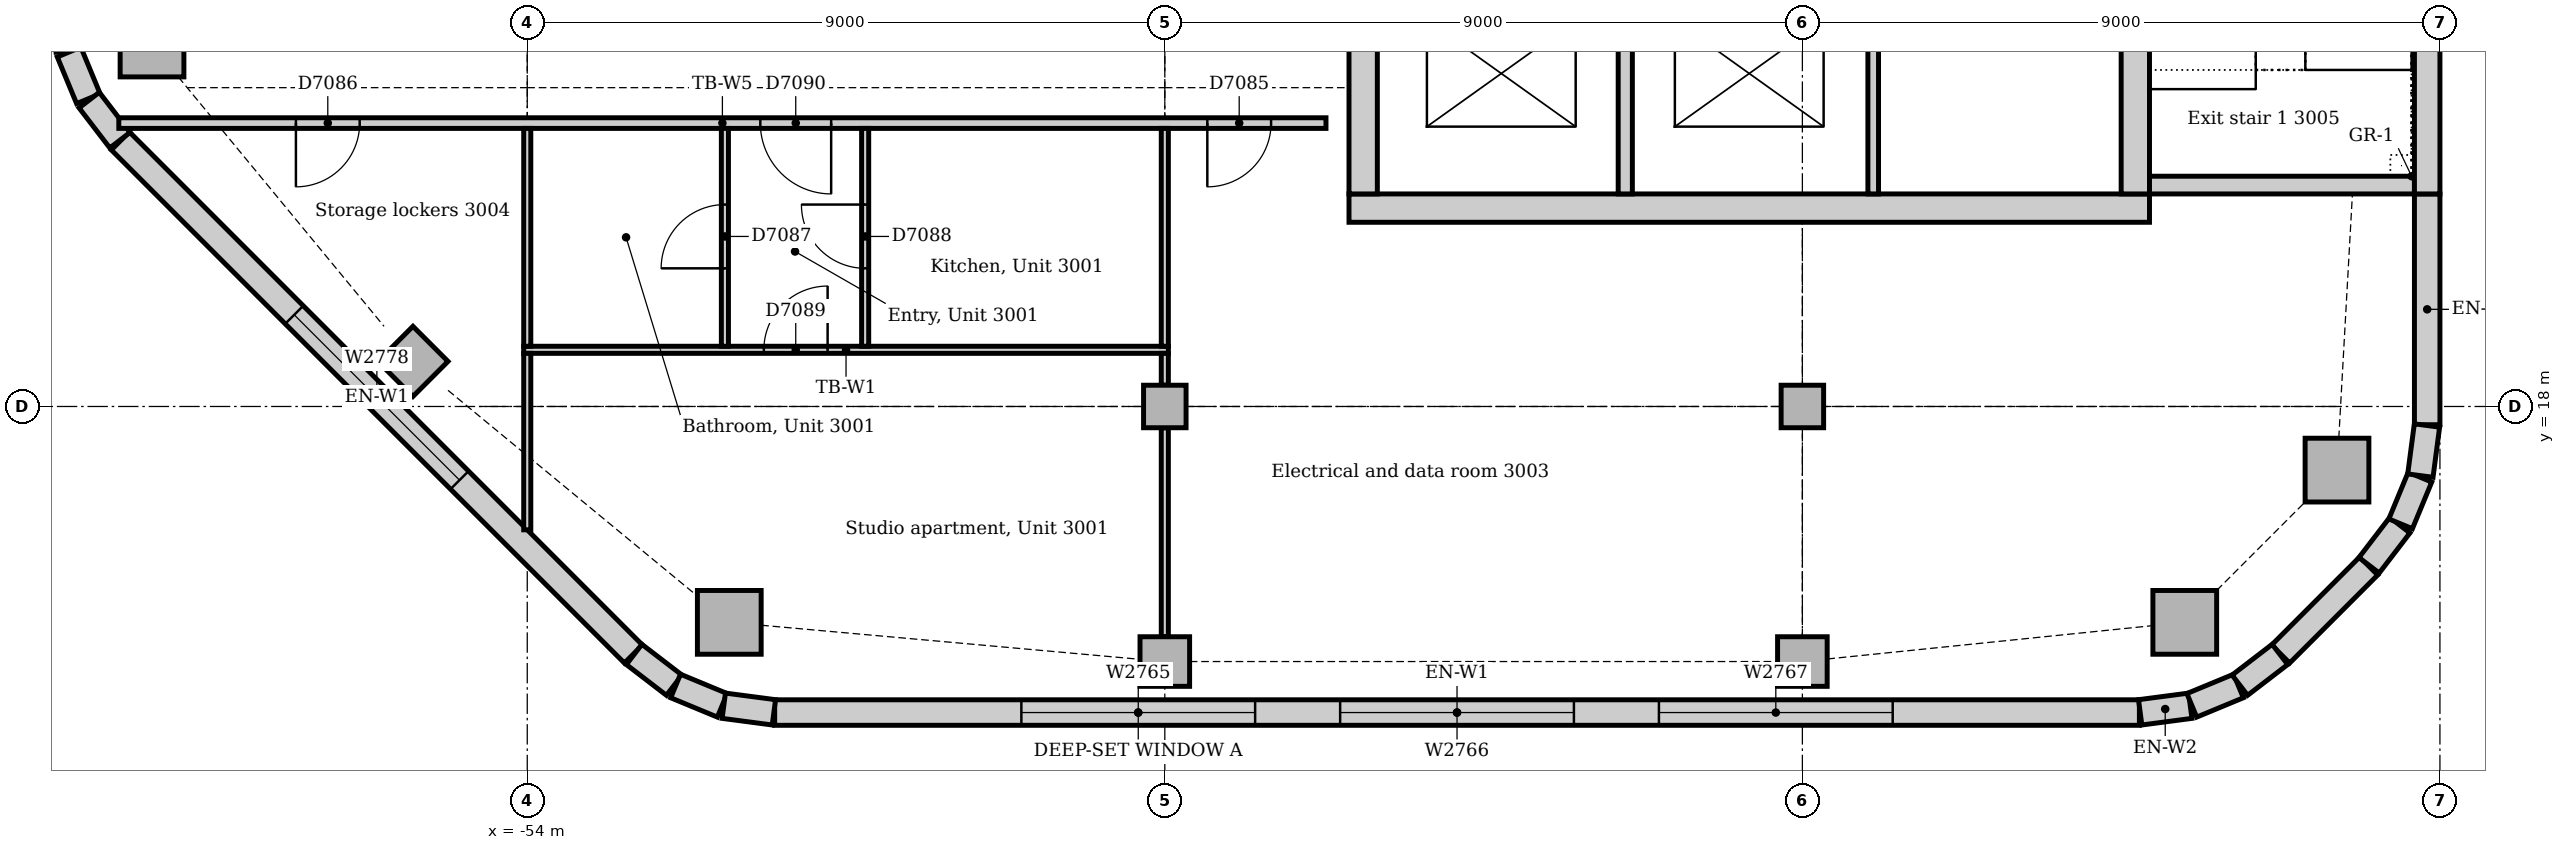
"""IFC4 building model, lengths in metres.
Left out: names, types, materials, properties, quantities, classifications, styles, units other than length and angle.
Written with IfcOpenShell. Run it as: python <this file> out.ifc"""

import sys

from ifc_helpers import new_model, si_unit, direction, frame, frame_2d, origin, origin_2d, place, context, subcontext, project, spatial, rectangle, extrude, element, fill, save


model = new_model("IFC4")
c1 = context("Model", 3, precision=1e-05, world=origin(), true_north=direction((0.0, 1.0)))
c2 = subcontext(c1, "Body", "Model", "MODEL_VIEW")
j1 = project(units=[si_unit("LENGTHUNIT", "METRE"), si_unit("PLANEANGLEUNIT", "RADIAN")], contexts=[c1])
p1 = place(None, origin())
s1 = spatial("IfcSite", under=j1, at=p1, CompositionType="ELEMENT")
p2 = place(p1, origin())
s2 = spatial("IfcBuilding", under=s1, at=p2, CompositionType="ELEMENT")
p3 = place(p2, frame((0.0, 0.0, 128.0)))
s3 = spatial("IfcBuildingStorey", under=s2, at=p3, CompositionType="ELEMENT", Elevation=128.0)
p4 = place(p3, frame((-42.4, 20.8, 0.0), z_axis=(0.0, 0.0, 1.0), x_axis=(1.0, 0.0, 0.0)))
e1 = element("IfcWall", 1, at=p4, inside=s3, PredefinedType="SOLIDWALL", context=c2, shape_type="SweptSolid", body=[
    extrude(rectangle(XDim=11.3, YDim=0.4, at=frame_2d((5.65, 0.0))), origin(), (0.0, 0.0, 1.0), 4.0),
])
p5 = place(p3, frame((-31.3, 21.0, 0.0), z_axis=(0.0, 0.0, 1.0), x_axis=(0.0, 1.0, 0.0)))
e2 = element("IfcWall", 2, at=p5, inside=s3, PredefinedType="SOLIDWALL", context=c2, shape_type="SweptSolid", body=[
    extrude(rectangle(XDim=9.5, YDim=0.4, at=frame_2d((4.75, 0.0))), origin(), (0.0, 0.0, 1.0), 4.0),
])
p6 = place(p5, frame((5.25, 0.0, 0.0)))
e3 = element("IfcOpeningElement", 3, at=p6, cuts=e2, PredefinedType="OPENING", context=c2, shape_type="SweptSolid", body=[
    extrude(rectangle(XDim=1.0, YDim=2.1, at=frame_2d((0.5, 1.05))), frame((0.0, 0.21, 0.0), z_axis=(0.0, -1.0, 0.0), x_axis=(1.0, 0.0, 0.0)), (0.0, 0.0, 1.0), 0.42),
])
p7 = place(p3, frame((-42.2, 30.5, 0.0), z_axis=(0.0, 0.0, 1.0), x_axis=(0.0, -1.0, 0.0)))
e4 = element("IfcWall", 4, at=p7, inside=s3, PredefinedType="SOLIDWALL", context=c2, shape_type="SweptSolid", body=[
    extrude(rectangle(XDim=9.5, YDim=0.4, at=frame_2d((4.75, 0.0))), origin(), (0.0, 0.0, 1.0), 4.0),
])
p8 = place(p7, frame((3.85, 0.0, 0.0)))
e5 = element("IfcOpeningElement", 5, at=p8, cuts=e4, PredefinedType="OPENING", context=c2, shape_type="SweptSolid", body=[
    extrude(rectangle(XDim=1.8, YDim=2.1, at=frame_2d((0.9, 1.05))), frame((0.0, 0.21, 0.0), z_axis=(0.0, -1.0, 0.0), x_axis=(1.0, 0.0, 0.0)), (0.0, 0.0, 1.0), 0.42),
])
p9 = place(p3, frame((-31.1, 21.125, 0.0), z_axis=(0.0, 0.0, 1.0), x_axis=(1.0, 0.0, 0.0)))
e6 = element("IfcWall", 6, at=p9, inside=s3, PredefinedType="SOLIDWALL", context=c2, shape_type="SweptSolid", body=[
    extrude(rectangle(XDim=3.74, YDim=0.25, at=frame_2d((1.87, 0.0))), origin(), (0.0, 0.0, 1.0), 4.0),
])
for number, where, z_axis, x_axis in (
    (7, (-51.148, 14.953, 0.0), (0.0, 0.0, 1.0), (1.0, 0.0, 0.0)),
    (8, (-30.602, 14.953, 0.0), (0.0, 0.0, 1.0), (1.0, 0.0, 0.0)),
    (9, (-28.453, 17.102, 0.0), (0.0, 0.0, 1.0), (1.0, 0.0, 0.0)),
    (10, (-59.297, 23.102, 0.0), (0.0, 0.0, 1.0), (1.0, 0.0, 0.0)),
):
    element("IfcColumn", number, at=place(p3, frame(where, z_axis=z_axis, x_axis=x_axis)), inside=s3, PredefinedType="COLUMN", context=c2, shape_type="SweptSolid", body=[
        extrude(rectangle(XDim=0.9, YDim=0.9, at=origin_2d()), origin(), (0.0, 0.0, 1.0), 3.85),
    ])
for number, where, z_axis, x_axis in (
    (11, (-45.0, 14.4, 0.0), (0.0, 0.0, 1.0), (1.0, 0.0, 0.0)),
    (12, (-36.0, 14.4, 0.0), (0.0, 0.0, 1.0), (1.0, 0.0, 0.0)),
    (13, (-55.614, 18.636, 0.0), (0.0, 0.0, 1.0), (0.707, 0.707, 0.0)),
):
    element("IfcColumn", number, at=place(p3, frame(where, z_axis=z_axis, x_axis=x_axis)), inside=s3, PredefinedType="COLUMN", context=c2, shape_type="SweptSolid", body=[
        extrude(rectangle(XDim=0.7, YDim=0.7, at=origin_2d()), origin(), (0.0, 0.0, 1.0), 3.85),
    ])
for number, where, z_axis, x_axis in (
    (14, (-45.0, 18.0, 0.0), (0.0, 0.0, 1.0), (1.0, 0.0, 0.0)),
    (15, (-36.0, 18.0, 0.0), (0.0, 0.0, 1.0), (1.0, 0.0, 0.0)),
):
    element("IfcColumn", number, at=place(p3, frame(where, z_axis=z_axis, x_axis=x_axis)), inside=s3, PredefinedType="COLUMN", context=c2, shape_type="SweptSolid", body=[
        extrude(rectangle(XDim=0.6, YDim=0.6, at=origin_2d()), origin(), (0.0, 0.0, 1.0), 3.85),
    ])
p10 = place(p3, frame((-50.507, 13.68, 0.0), z_axis=(0.0, 0.0, 1.0), x_axis=(1.0, 0.0, 0.0)))
e16 = element("IfcWall", 16, at=p10, inside=s3, PredefinedType="STANDARD", context=c2, shape_type="SweptSolid", body=[
    extrude(rectangle(XDim=19.265, YDim=0.36, at=frame_2d((9.632, 0.0))), origin(), (0.0, 0.0, 1.0), 3.85),
])
p11 = place(p10, frame((3.482, 0.0, 0.9)))
e17 = element("IfcOpeningElement", 17, at=p11, cuts=e16, PredefinedType="OPENING", context=c2, shape_type="SweptSolid", body=[
    extrude(rectangle(XDim=3.3, YDim=1.6, at=frame_2d((1.65, 0.8))), frame((0.0, 0.19, 0.0), z_axis=(0.0, -1.0, 0.0), x_axis=(1.0, 0.0, 0.0)), (0.0, 0.0, 1.0), 0.38),
])
p12 = place(p10, frame((7.982, 0.0, 0.9)))
e18 = element("IfcOpeningElement", 18, at=p12, cuts=e16, PredefinedType="OPENING", context=c2, shape_type="SweptSolid", body=[
    extrude(rectangle(XDim=3.3, YDim=1.6, at=frame_2d((1.65, 0.8))), frame((0.0, 0.19, 0.0), z_axis=(0.0, -1.0, 0.0), x_axis=(1.0, 0.0, 0.0)), (0.0, 0.0, 1.0), 0.38),
])
p13 = place(p10, frame((12.482, 0.0, 0.9)))
e19 = element("IfcOpeningElement", 19, at=p13, cuts=e16, PredefinedType="OPENING", context=c2, shape_type="SweptSolid", body=[
    extrude(rectangle(XDim=3.3, YDim=1.6, at=frame_2d((1.65, 0.8))), frame((0.0, 0.19, 0.0), z_axis=(0.0, -1.0, 0.0), x_axis=(1.0, 0.0, 0.0)), (0.0, 0.0, 1.0), 0.38),
])
p14 = place(p3, frame((-29.249, 14.506, 0.0), z_axis=(0.0, 0.0, 1.0), x_axis=(0.707106781187, 0.707106781187, 0.0)))
e20 = element("IfcWall", 20, at=p14, inside=s3, PredefinedType="STANDARD", context=c2, shape_type="SweptSolid", body=[
    extrude(rectangle(XDim=1.757, YDim=0.36, at=frame_2d((0.879, 0.0))), origin(), (0.0, 0.0, 1.0), 3.85),
])
p15 = place(p3, frame((-27.18, 17.743, 0.0), z_axis=(0.0, 0.0, 1.0), x_axis=(0.0, 1.0, 0.0)))
e21 = element("IfcWall", 21, at=p15, inside=s3, PredefinedType="STANDARD", context=c2, shape_type="SweptSolid", body=[
    extrude(rectangle(XDim=3.257, YDim=0.36, at=frame_2d((1.629, 0.0))), origin(), (0.0, 0.0, 1.0), 3.85),
])
p16 = place(p3, frame((-27.18, 21.0, 0.0), z_axis=(0.0, 0.0, 1.0), x_axis=(0.0, 1.0, 0.0)))
e22 = element("IfcWall", 22, at=p16, inside=s3, PredefinedType="STANDARD", context=c2, shape_type="SweptSolid", body=[
    extrude(rectangle(XDim=6.75, YDim=0.36, at=frame_2d((3.375, 0.0))), origin(), (0.0, 0.0, 1.0), 3.85),
])
p17 = place(p3, frame((-59.744, 21.749, 0.0), z_axis=(0.0, 0.0, 1.0), x_axis=(0.707106781187, -0.707106781187, 0.0)))
e23 = element("IfcWall", 23, at=p17, inside=s3, PredefinedType="STANDARD", context=c2, shape_type="SweptSolid", body=[
    extrude(rectangle(XDim=10.243, YDim=0.36, at=frame_2d((5.121, 0.0))), origin(), (0.0, 0.0, 1.0), 3.85),
])
p18 = place(p17, frame((3.471, 0.0, 0.9)))
e24 = element("IfcOpeningElement", 24, at=p18, cuts=e23, PredefinedType="OPENING", context=c2, shape_type="SweptSolid", body=[
    extrude(rectangle(XDim=3.3, YDim=1.6, at=frame_2d((1.65, 0.8))), frame((0.0, 0.19, 0.0), z_axis=(0.0, -1.0, 0.0), x_axis=(1.0, 0.0, 0.0)), (0.0, 0.0, 1.0), 0.38),
])
for number, where, z_axis, x_axis in (
    (25, (-31.231, 13.683, 0.0), (0.0, 0.0, 1.0), (0.991, 0.131, 0.0)),
    (26, (-30.503, 13.782, 0.0), (0.0, 0.0, 1.0), (0.924, 0.383, 0.0)),
):
    element("IfcWall", number, at=place(p3, frame(where, z_axis=z_axis, x_axis=x_axis)), inside=s3, PredefinedType="STANDARD", context=c2, shape_type="SweptSolid", body=[
        extrude(rectangle(XDim=0.713, YDim=0.36, at=frame_2d((0.356, 0.0))), origin(), (0.0, 0.0, 1.0), 3.85),
    ])
for number, where, z_axis, x_axis in (
    (27, (-29.825, 14.066, 0.0), (0.0, 0.0, 1.0), (0.793, 0.609, 0.0)),
    (28, (-28.0, 15.759, 0.0), (0.0, 0.0, 1.0), (0.609, 0.793, 0.0)),
):
    element("IfcWall", number, at=place(p3, frame(where, z_axis=z_axis, x_axis=x_axis)), inside=s3, PredefinedType="STANDARD", context=c2, shape_type="SweptSolid", body=[
        extrude(rectangle(XDim=0.713, YDim=0.36, at=frame_2d((0.357, 0.0))), origin(), (0.0, 0.0, 1.0), 3.85),
    ])
for number, where, z_axis, x_axis in (
    (29, (-27.555, 16.344, 0.0), (0.0, 0.0, 1.0), (0.383, 0.924, 0.0)),
    (30, (-27.276, 17.024, 0.0), (0.0, 0.0, 1.0), (0.131, 0.991, 0.0)),
    (31, (-60.468, 23.003, 0.0), (0.0, 0.0, 1.0), (0.383, -0.924, 0.0)),
):
    element("IfcWall", number, at=place(p3, frame(where, z_axis=z_axis, x_axis=x_axis)), inside=s3, PredefinedType="STANDARD", context=c2, shape_type="SweptSolid", body=[
        extrude(rectangle(XDim=0.713, YDim=0.36, at=frame_2d((0.356, 0.0))), origin(), (0.0, 0.0, 1.0), 3.85),
    ])
for number, where, z_axis, x_axis in (
    (32, (-60.184, 22.325, 0.0), (0.0, 0.0, 1.0), (0.609, -0.793, 0.0)),
    (33, (-52.491, 14.5, 0.0), (0.0, 0.0, 1.0), (0.793, -0.609, 0.0)),
):
    element("IfcWall", number, at=place(p3, frame(where, z_axis=z_axis, x_axis=x_axis)), inside=s3, PredefinedType="STANDARD", context=c2, shape_type="SweptSolid", body=[
        extrude(rectangle(XDim=0.713, YDim=0.36, at=frame_2d((0.357, 0.0))), origin(), (0.0, 0.0, 1.0), 3.85),
    ])
for number, where, z_axis, x_axis in (
    (34, (-51.906, 14.055, 0.0), (0.0, 0.0, 1.0), (0.924, -0.383, 0.0)),
    (35, (-51.226, 13.776, 0.0), (0.0, 0.0, 1.0), (0.991, -0.131, 0.0)),
):
    element("IfcWall", number, at=place(p3, frame(where, z_axis=z_axis, x_axis=x_axis)), inside=s3, PredefinedType="STANDARD", context=c2, shape_type="SweptSolid", body=[
        extrude(rectangle(XDim=0.713, YDim=0.36, at=frame_2d((0.356, 0.0))), origin(), (0.0, 0.0, 1.0), 3.85),
    ])
p19 = place(p3, frame((-38.5, 21.0, 0.0), z_axis=(0.0, 0.0, 1.0), x_axis=(0.0, 1.0, 0.0)))
e36 = element("IfcWall", 36, at=p19, inside=s3, PredefinedType="SOLIDWALL", context=c2, shape_type="SweptSolid", body=[
    extrude(rectangle(XDim=3.1, YDim=0.2, at=frame_2d((1.55, 0.0))), origin(), (0.0, 0.0, 1.0), 4.0),
])
p20 = place(p3, frame((-35.0, 21.0, 0.0), z_axis=(0.0, 0.0, 1.0), x_axis=(0.0, 1.0, 0.0)))
e37 = element("IfcWall", 37, at=p20, inside=s3, PredefinedType="SOLIDWALL", context=c2, shape_type="SweptSolid", body=[
    extrude(rectangle(XDim=2.9, YDim=0.15, at=frame_2d((1.45, 0.0))), origin(), (0.0, 0.0, 1.0), 4.0),
])
p21 = place(p3, frame((-59.766, 22.0, 0.0), z_axis=(0.0, 0.0, 1.0), x_axis=(1.0, 0.0, 0.0)))
e38 = element("IfcWall", 38, at=p21, inside=s3, PredefinedType="PARTITIONING", context=c2, shape_type="SweptSolid", body=[
    extrude(rectangle(XDim=17.041, YDim=0.15, at=frame_2d((8.52, 0.0))), origin(), (0.0, 0.0, 1.0), 3.85),
])
p22 = place(p21, frame((15.366, 0.0, 0.0)))
e39 = element("IfcOpeningElement", 39, at=p22, cuts=e38, PredefinedType="OPENING", context=c2, shape_type="SweptSolid", body=[
    extrude(rectangle(XDim=0.9, YDim=2.1, at=frame_2d((0.45, 1.05))), frame((0.0, 0.085, 0.0), z_axis=(0.0, -1.0, 0.0), x_axis=(1.0, 0.0, 0.0)), (0.0, 0.0, 1.0), 0.17),
])
p23 = place(p21, frame((2.5, 0.0, 0.0)))
e40 = element("IfcOpeningElement", 40, at=p23, cuts=e38, PredefinedType="OPENING", context=c2, shape_type="SweptSolid", body=[
    extrude(rectangle(XDim=0.9, YDim=2.1, at=frame_2d((0.45, 1.05))), frame((0.0, 0.085, 0.0), z_axis=(0.0, -1.0, 0.0), x_axis=(1.0, 0.0, 0.0)), (0.0, 0.0, 1.0), 0.17),
])
p24 = place(p21, frame((9.056, 0.0, 0.0)))
e41 = element("IfcOpeningElement", 41, at=p24, cuts=e38, PredefinedType="OPENING", context=c2, shape_type="SweptSolid", body=[
    extrude(rectangle(XDim=1.0, YDim=2.1, at=frame_2d((0.5, 1.05))), frame((0.0, 0.085, 0.0), z_axis=(0.0, -1.0, 0.0), x_axis=(1.0, 0.0, 0.0)), (0.0, 0.0, 1.0), 0.17),
])
p25 = place(p3, frame((-54.05, 18.8, 0.0), z_axis=(0.0, 0.0, 1.0), x_axis=(1.0, 0.0, 0.0)))
e42 = element("IfcWall", 42, at=p25, inside=s3, PredefinedType="PARTITIONING", context=c2, shape_type="SweptSolid", body=[
    extrude(rectangle(XDim=9.1, YDim=0.1, at=frame_2d((4.55, 0.0))), origin(), (0.0, 0.0, 1.0), 3.85),
])
p26 = place(p25, frame((3.39, 0.0, 0.0)))
e43 = element("IfcOpeningElement", 43, at=p26, cuts=e42, PredefinedType="OPENING", context=c2, shape_type="SweptSolid", body=[
    extrude(rectangle(XDim=0.9, YDim=2.1, at=frame_2d((0.45, 1.05))), frame((0.0, 0.06, 0.0), z_axis=(0.0, -1.0, 0.0), x_axis=(1.0, 0.0, 0.0)), (0.0, 0.0, 1.0), 0.12),
])
p27 = place(p3, frame((-45.0, 18.85, 0.0), z_axis=(0.0, 0.0, 1.0), x_axis=(0.0, 1.0, 0.0)))
e44 = element("IfcWall", 44, at=p27, inside=s3, PredefinedType="PARTITIONING", context=c2, shape_type="SweptSolid", body=[
    extrude(rectangle(XDim=3.075, YDim=0.1, at=frame_2d((1.538, 0.0))), origin(), (0.0, 0.0, 1.0), 3.362),
])
p28 = place(p3, frame((-45.0, 18.3, 0.0), z_axis=(0.0, 0.0, 1.0), x_axis=(0.0, 1.0, 0.0)))
e45 = element("IfcWall", 45, at=p28, inside=s3, PredefinedType="PARTITIONING", context=c2, shape_type="SweptSolid", body=[
    extrude(rectangle(XDim=0.45, YDim=0.1, at=frame_2d((0.225, 0.0))), origin(), (0.0, 0.0, 1.0), 3.85),
])
p29 = place(p3, frame((-45.0, 14.75, 0.0), z_axis=(0.0, 0.0, 1.0), x_axis=(0.0, 1.0, 0.0)))
e46 = element("IfcWall", 46, at=p29, inside=s3, PredefinedType="PARTITIONING", context=c2, shape_type="SweptSolid", body=[
    extrude(rectangle(XDim=2.95, YDim=0.1, at=frame_2d((1.475, 0.0))), origin(), (0.0, 0.0, 1.0), 3.652),
])
p30 = place(p3, frame((-54.0, 18.85, 0.0), z_axis=(0.0, 0.0, 1.0), x_axis=(0.0, 1.0, 0.0)))
e47 = element("IfcWall", 47, at=p30, inside=s3, PredefinedType="PARTITIONING", context=c2, shape_type="SweptSolid", body=[
    extrude(rectangle(XDim=3.075, YDim=0.1, at=frame_2d((1.538, 0.0))), origin(), (0.0, 0.0, 1.0), 3.362),
])
p31 = place(p3, frame((-54.0, 16.259, 0.0), z_axis=(0.0, 0.0, 1.0), x_axis=(0.0, 1.0, 0.0)))
e48 = element("IfcWall", 48, at=p31, inside=s3, PredefinedType="PARTITIONING", context=c2, shape_type="SweptSolid", body=[
    extrude(rectangle(XDim=2.491, YDim=0.1, at=frame_2d((1.245, 0.0))), origin(), (0.0, 0.0, 1.0), 3.362),
])
p32 = place(p3, frame((-51.21, 18.85, 0.0), z_axis=(0.0, 0.0, 1.0), x_axis=(0.0, 1.0, 0.0)))
e49 = element("IfcWall", 49, at=p32, inside=s3, PredefinedType="PARTITIONING", context=c2, shape_type="SweptSolid", body=[
    extrude(rectangle(XDim=3.075, YDim=0.1, at=frame_2d((1.538, 0.0))), origin(), (0.0, 0.0, 1.0), 3.85),
])
p33 = place(p32, frame((1.1, 0.0, 0.0)))
e50 = element("IfcOpeningElement", 50, at=p33, cuts=e49, PredefinedType="OPENING", context=c2, shape_type="SweptSolid", body=[
    extrude(rectangle(XDim=0.9, YDim=2.1, at=frame_2d((0.45, 1.05))), frame((0.0, 0.06, 0.0), z_axis=(0.0, -1.0, 0.0), x_axis=(1.0, 0.0, 0.0)), (0.0, 0.0, 1.0), 0.12),
])
p34 = place(p3, frame((-49.23, 18.85, 0.0), z_axis=(0.0, 0.0, 1.0), x_axis=(0.0, 1.0, 0.0)))
e51 = element("IfcWall", 51, at=p34, inside=s3, PredefinedType="PARTITIONING", context=c2, shape_type="SweptSolid", body=[
    extrude(rectangle(XDim=3.075, YDim=0.1, at=frame_2d((1.538, 0.0))), origin(), (0.0, 0.0, 1.0), 3.85),
])
p35 = place(p34, frame((1.1, 0.0, 0.0)))
e52 = element("IfcOpeningElement", 52, at=p35, cuts=e51, PredefinedType="OPENING", context=c2, shape_type="SweptSolid", body=[
    extrude(rectangle(XDim=0.9, YDim=2.1, at=frame_2d((0.45, 1.05))), frame((0.0, 0.06, 0.0), z_axis=(0.0, -1.0, 0.0), x_axis=(1.0, 0.0, 0.0)), (0.0, 0.0, 1.0), 0.12),
])
p36 = place(p11, origin())
e53 = element("IfcWindow", 53, at=p36, inside=s3, PartitioningType="SINGLE_PANEL", PredefinedType="WINDOW", context=c2, shape_type="SweptSolid", body=[
    extrude(rectangle(XDim=3.3, YDim=1.6, at=frame_2d((1.65, 0.8))), frame((0.0, 0.13, 0.0), z_axis=(0.0, -1.0, 0.0), x_axis=(1.0, 0.0, 0.0)), (0.0, 0.0, 1.0), 0.06),
])
fill(e17, e53)
p37 = place(p12, origin())
e54 = element("IfcWindow", 54, at=p37, inside=s3, PartitioningType="SINGLE_PANEL", PredefinedType="WINDOW", context=c2, shape_type="SweptSolid", body=[
    extrude(rectangle(XDim=3.3, YDim=1.6, at=frame_2d((1.65, 0.8))), frame((0.0, 0.13, 0.0), z_axis=(0.0, -1.0, 0.0), x_axis=(1.0, 0.0, 0.0)), (0.0, 0.0, 1.0), 0.06),
])
fill(e18, e54)
p38 = place(p13, origin())
e55 = element("IfcWindow", 55, at=p38, inside=s3, PartitioningType="SINGLE_PANEL", PredefinedType="WINDOW", context=c2, shape_type="SweptSolid", body=[
    extrude(rectangle(XDim=3.3, YDim=1.6, at=frame_2d((1.65, 0.8))), frame((0.0, 0.13, 0.0), z_axis=(0.0, -1.0, 0.0), x_axis=(1.0, 0.0, 0.0)), (0.0, 0.0, 1.0), 0.06),
])
fill(e19, e55)
p39 = place(p18, origin())
e56 = element("IfcWindow", 56, at=p39, inside=s3, PartitioningType="SINGLE_PANEL", PredefinedType="WINDOW", context=c2, shape_type="SweptSolid", body=[
    extrude(rectangle(XDim=3.3, YDim=1.6, at=frame_2d((1.65, 0.8))), frame((0.0, 0.13, 0.0), z_axis=(0.0, -1.0, 0.0), x_axis=(1.0, 0.0, 0.0)), (0.0, 0.0, 1.0), 0.06),
])
fill(e24, e56)
p40 = place(p22, frame((0.9, 0.0, 0.0), z_axis=(0.0, 0.0, 1.0), x_axis=(-1.0, 0.0, 0.0)))
e57 = element("IfcDoor", 57, at=p40, inside=s3, OperationType="SINGLE_SWING_RIGHT", PredefinedType="DOOR", context=c2, shape_type="SweptSolid", body=[
    extrude(rectangle(XDim=0.9, YDim=2.1, at=frame_2d((0.45, 1.05))), frame((0.0, 0.025, 0.0), z_axis=(0.0, -1.0, 0.0), x_axis=(1.0, 0.0, 0.0)), (0.0, 0.0, 1.0), 0.05),
])
fill(e39, e57)
p41 = place(p23, frame((0.9, 0.0, 0.0), z_axis=(0.0, 0.0, 1.0), x_axis=(-1.0, 0.0, 0.0)))
e58 = element("IfcDoor", 58, at=p41, inside=s3, OperationType="SINGLE_SWING_RIGHT", PredefinedType="DOOR", context=c2, shape_type="SweptSolid", body=[
    extrude(rectangle(XDim=0.9, YDim=2.1, at=frame_2d((0.45, 1.05))), frame((0.0, 0.025, 0.0), z_axis=(0.0, -1.0, 0.0), x_axis=(1.0, 0.0, 0.0)), (0.0, 0.0, 1.0), 0.05),
])
fill(e40, e58)
p42 = place(p33, origin())
e59 = element("IfcDoor", 59, at=p42, inside=s3, OperationType="SINGLE_SWING_LEFT", PredefinedType="DOOR", context=c2, shape_type="SweptSolid", body=[
    extrude(rectangle(XDim=0.9, YDim=2.1, at=frame_2d((0.45, 1.05))), frame((0.0, 0.025, 0.0), z_axis=(0.0, -1.0, 0.0), x_axis=(1.0, 0.0, 0.0)), (0.0, 0.0, 1.0), 0.05),
])
fill(e50, e59)
p43 = place(p35, origin())
e60 = element("IfcDoor", 60, at=p43, inside=s3, OperationType="SINGLE_SWING_RIGHT", PredefinedType="DOOR", context=c2, shape_type="SweptSolid", body=[
    extrude(rectangle(XDim=0.9, YDim=2.1, at=frame_2d((0.45, 1.05))), frame((0.0, 0.025, 0.0), z_axis=(0.0, -1.0, 0.0), x_axis=(1.0, 0.0, 0.0)), (0.0, 0.0, 1.0), 0.05),
])
fill(e52, e60)
p44 = place(p26, origin())
e61 = element("IfcDoor", 61, at=p44, inside=s3, OperationType="SINGLE_SWING_RIGHT", PredefinedType="DOOR", context=c2, shape_type="SweptSolid", body=[
    extrude(rectangle(XDim=0.9, YDim=2.1, at=frame_2d((0.45, 1.05))), frame((0.0, 0.025, 0.0), z_axis=(0.0, -1.0, 0.0), x_axis=(1.0, 0.0, 0.0)), (0.0, 0.0, 1.0), 0.05),
])
fill(e43, e61)
p45 = place(p24, frame((1.0, 0.0, 0.0), z_axis=(0.0, 0.0, 1.0), x_axis=(-1.0, 0.0, 0.0)))
e62 = element("IfcDoor", 62, at=p45, inside=s3, OperationType="SINGLE_SWING_LEFT", PredefinedType="DOOR", context=c2, shape_type="SweptSolid", body=[
    extrude(rectangle(XDim=1.0, YDim=2.1, at=frame_2d((0.5, 1.05))), frame((0.0, 0.025, 0.0), z_axis=(0.0, -1.0, 0.0), x_axis=(1.0, 0.0, 0.0)), (0.0, 0.0, 1.0), 0.05),
])
fill(e41, e62)
save(model, sys.argv[1])
